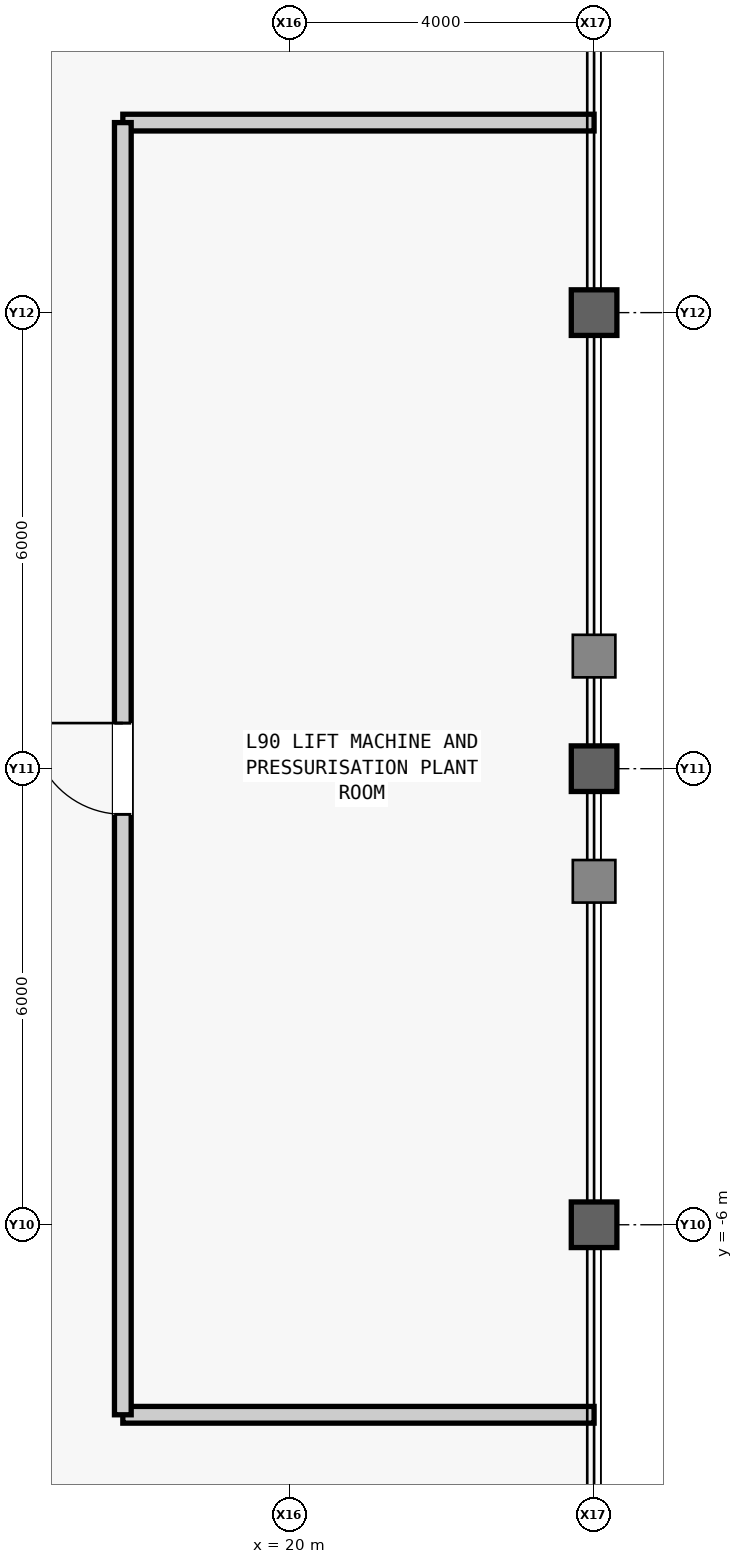
"""IFC4 building model, lengths in metres.
Left out: names, types, materials, properties, quantities, classifications, styles, units other than length and angle.
Written with IfcOpenShell. Run it as: python <this file> out.ifc"""

import sys

from ifc_helpers import new_model, si_unit, direction, frame, frame_2d, origin, origin_2d, place, context, subcontext, project, spatial, rectangle, hollow_rectangle, extrude, source, transform, mapped, element, fill, save


model = new_model("IFC4")
c1 = context("Model", 3, precision=1e-05, world=origin(), true_north=direction((0.0, 1.0)))
c2 = subcontext(c1, "Body", "Model", "MODEL_VIEW")
j1 = project(units=[si_unit("LENGTHUNIT", "METRE"), si_unit("PLANEANGLEUNIT", "RADIAN")], contexts=[c1])
p1 = place(None, origin())
s1 = spatial("IfcSite", under=j1, at=p1, CompositionType="ELEMENT")
p2 = place(p1, origin())
s2 = spatial("IfcBuilding", under=s1, at=p2, CompositionType="ELEMENT")
p3 = place(p2, frame((0.0, 0.0, 380.3)))
s3 = spatial("IfcBuildingStorey", under=s2, at=p3, CompositionType="ELEMENT", Elevation=380.3)
m1 = source(origin(), c2, "Body", "SweptSolid", [
    extrude(hollow_rectangle(XDim=0.6, YDim=0.6, WallThickness=0.035, at=origin_2d()), origin(), (0.0, 0.0, 1.0), 4.8),
])
for number, where, z_axis, x_axis in (
    (1, (24.0, -6.0, 0.0), (0.0, 0.0, 1.0), (1.0, 0.0, 0.0)),
    (2, (24.0, 0.0, 0.0), (0.0, 0.0, 1.0), (1.0, 0.0, 0.0)),
    (3, (24.0, 6.0, 0.0), (0.0, 0.0, 1.0), (1.0, 0.0, 0.0)),
):
    element("IfcColumn", number, at=place(p3, frame(where, z_axis=z_axis, x_axis=x_axis)), inside=s3, PredefinedType="COLUMN", context=c2, shape_type="MappedRepresentation", body=[
        mapped(m1, transform((0.0, 0.0, 0.0), scale=1.0)),
    ])
m2 = source(origin(), c2, "Body", "SweptSolid", [
    extrude(rectangle(XDim=6.2, YDim=0.22, at=frame_2d((3.1, 0.0))), origin(), (0.0, 0.0, 1.0), 4.45),
])
for number, where, z_axis, x_axis in (
    (4, (17.8, -8.5, 0.0), (0.0, 0.0, 1.0), (1.0, 0.0, 0.0)),
    (5, (17.8, 8.5, 0.0), (0.0, 0.0, 1.0), (1.0, 0.0, 0.0)),
):
    element("IfcWall", number, at=place(p3, frame(where, z_axis=z_axis, x_axis=x_axis)), inside=s3, PredefinedType="PARTITIONING", context=c2, shape_type="MappedRepresentation", body=[
        mapped(m2, transform((0.0, 0.0, 0.0), scale=1.0)),
    ])
m3 = source(origin(), c2, "Body", "SweptSolid", [
    extrude(rectangle(XDim=17.0, YDim=0.22, at=frame_2d((8.5, 0.0))), origin(), (0.0, 0.0, 1.0), 4.45),
])
p4 = place(p3, frame((17.8, -8.5, 0.0), z_axis=(0.0, 0.0, 1.0), x_axis=(0.0, 1.0, 0.0)))
e6 = element("IfcWall", 6, at=p4, inside=s3, PredefinedType="PARTITIONING", context=c2, shape_type="MappedRepresentation", body=[
    mapped(m3, transform((0.0, 0.0, 0.0), scale=1.0)),
])
m4 = source(origin(), c2, "Body", "SweptSolid", [
    extrude(rectangle(XDim=1.2, YDim=2.2, at=frame_2d((0.6, 1.1))), frame((0.0, 0.12, 0.0), z_axis=(0.0, -1.0, 0.0), x_axis=(1.0, 0.0, 0.0)), (0.0, 0.0, 1.0), 0.24),
])
p5 = place(p4, frame((7.9, 0.0, 0.0)))
e7 = element("IfcOpeningElement", 7, at=p5, cuts=e6, PredefinedType="OPENING", context=c2, shape_type="MappedRepresentation", body=[
    mapped(m4, transform((0.0, 0.0, 0.0), scale=1.0)),
])
m5 = source(origin(), c2, "Body", "SweptSolid", [
    extrude(rectangle(XDim=1.2, YDim=2.2, at=frame_2d((0.6, 1.1))), frame((0.0, 0.025, 0.0), z_axis=(0.0, -1.0, 0.0), x_axis=(1.0, 0.0, 0.0)), (0.0, 0.0, 1.0), 0.05),
])
p6 = place(p5, origin())
e8 = element("IfcDoor", 8, at=p6, inside=s3, OperationType="SINGLE_SWING_RIGHT", PredefinedType="DOOR", context=c2, shape_type="MappedRepresentation", body=[
    mapped(m5, transform((0.0, 0.0, 0.0), scale=1.0)),
])
fill(e7, e8)
save(model, sys.argv[1])
